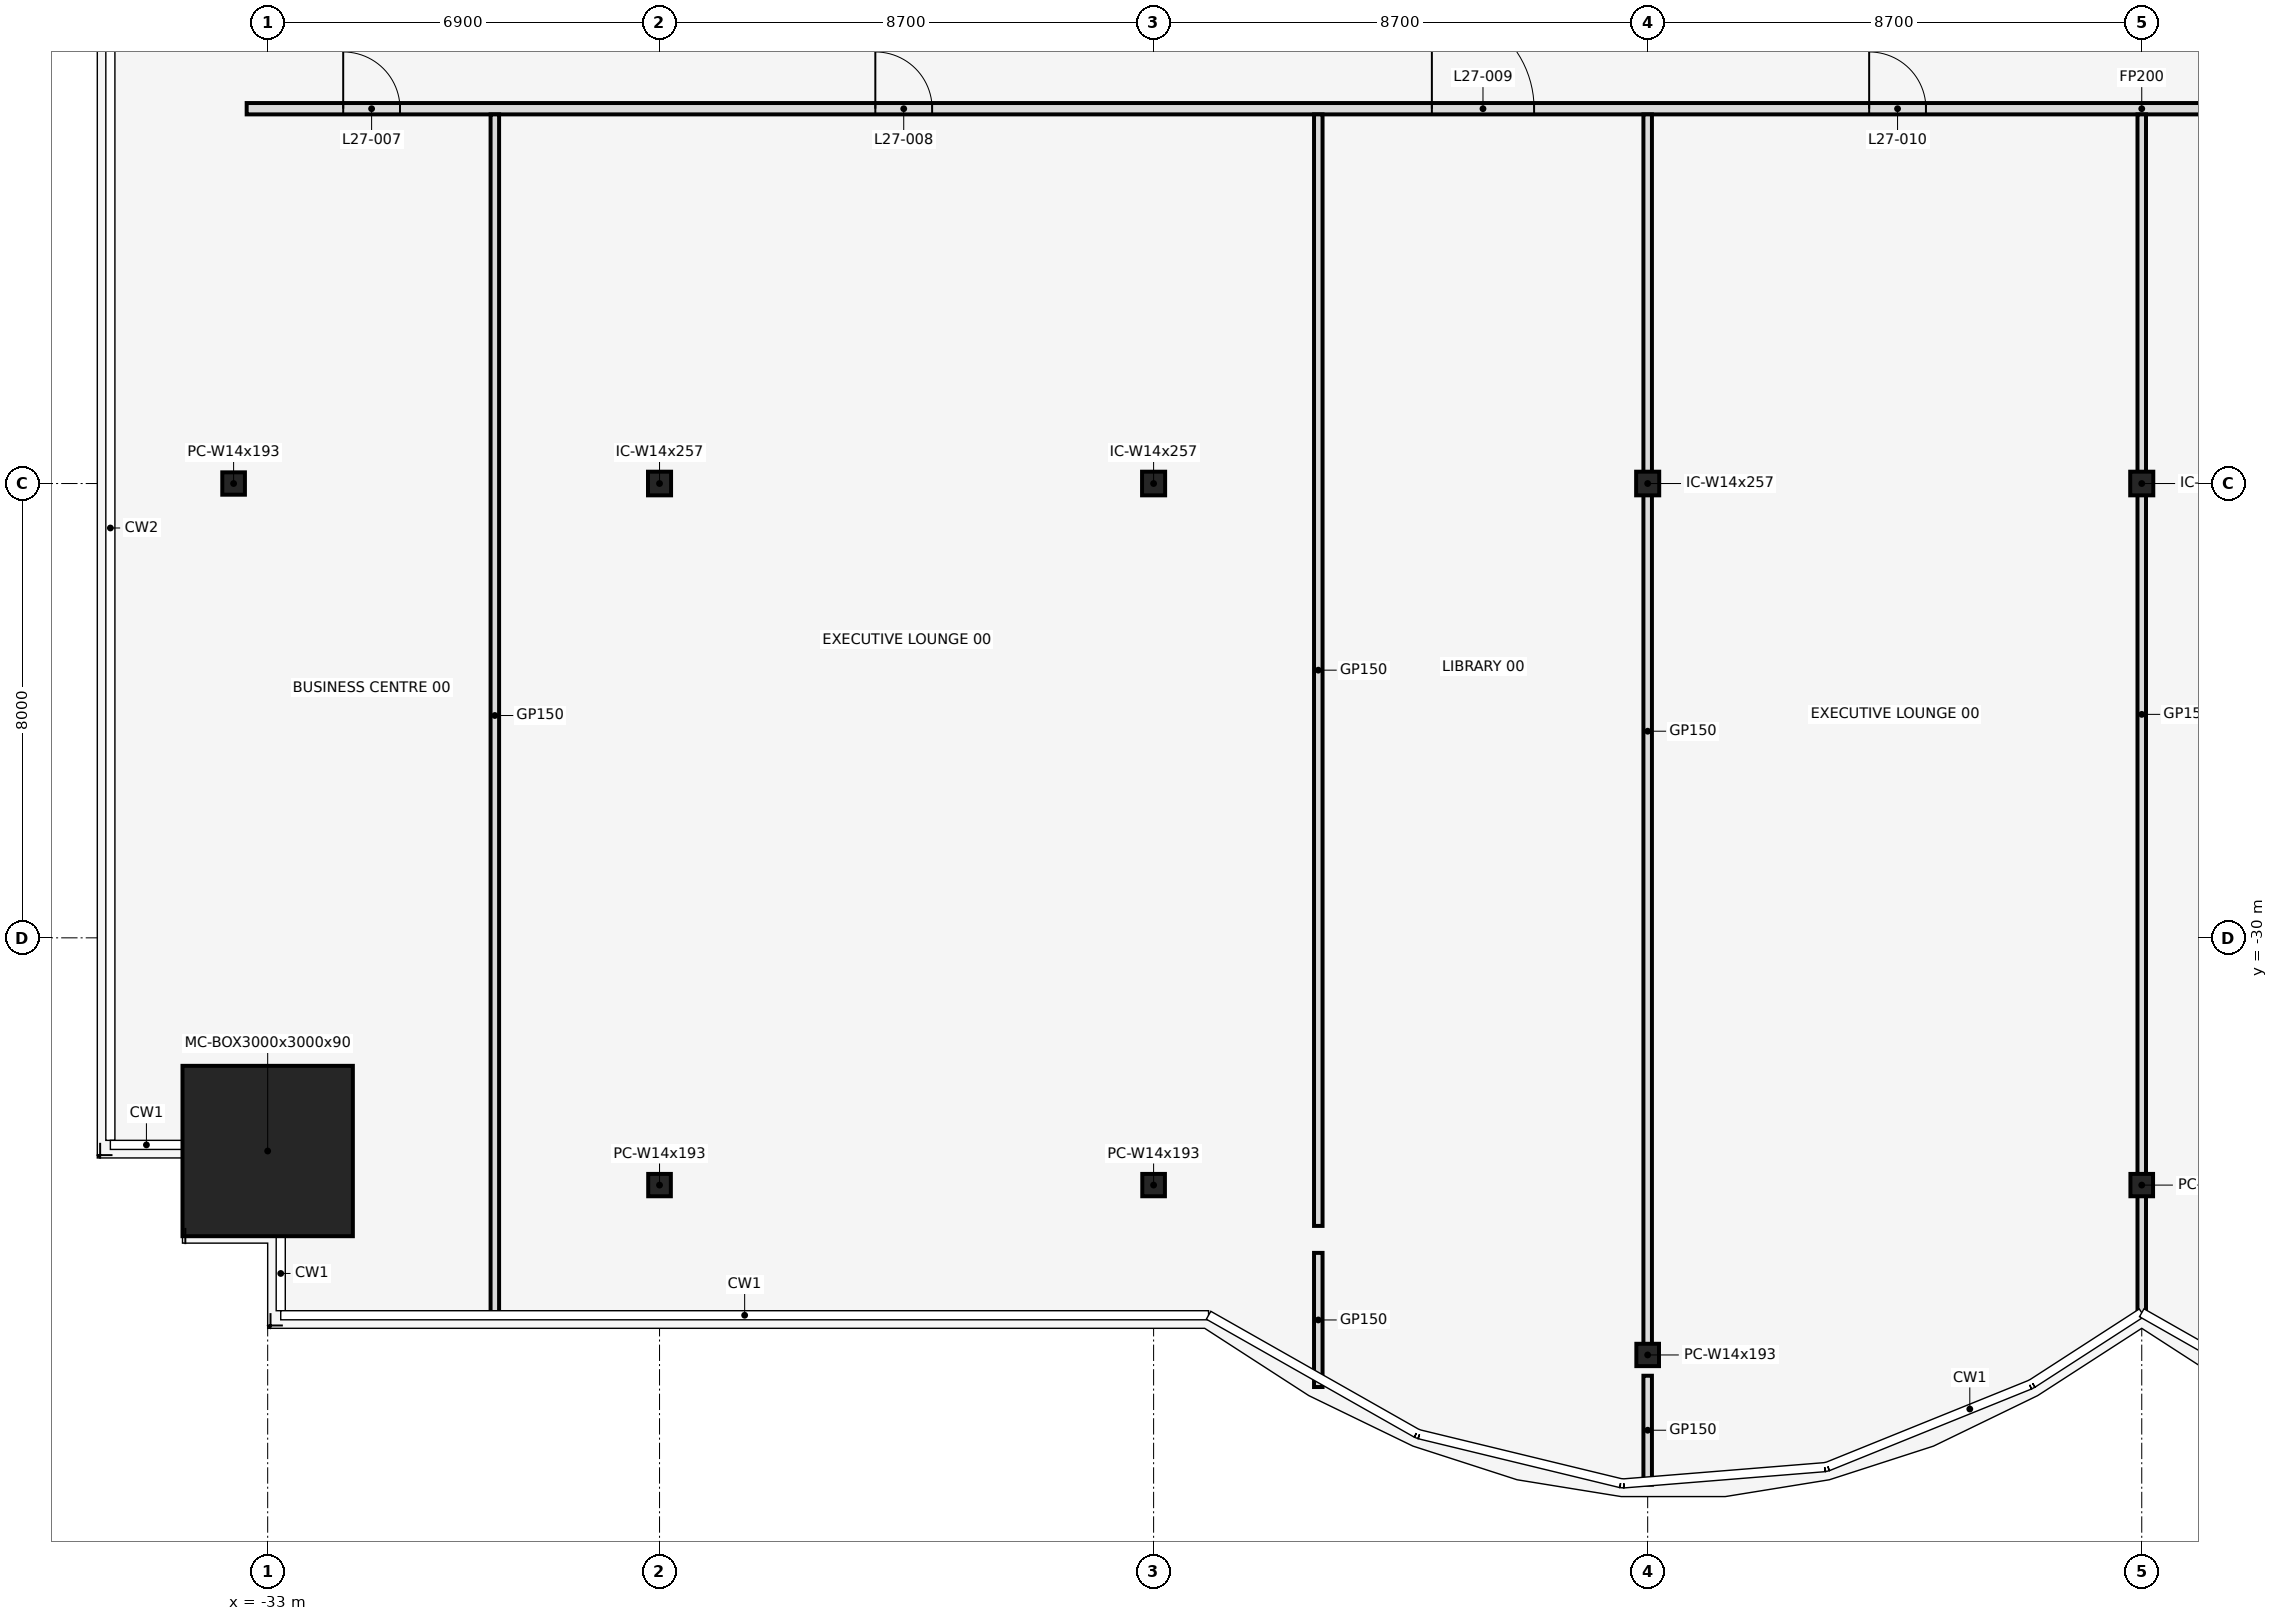
"""IFC4 building model, lengths in metres.
Left out: names, types, materials, properties, quantities, classifications, styles, units other than length and angle.
Written with IfcOpenShell. Run it as: python <this file> out.ifc"""

import sys

from ifc_helpers import new_model, si_unit, direction, frame, frame_2d, origin, origin_2d, place, context, subcontext, project, spatial, rectangle, hollow_rectangle, i_section, extrude, element, fill, save


model = new_model("IFC4")
c1 = context("Model", 3, precision=1e-05, world=origin(), true_north=direction((0.0, 1.0)))
c2 = subcontext(c1, "Body", "Model", "MODEL_VIEW")
j1 = project(units=[si_unit("LENGTHUNIT", "METRE"), si_unit("PLANEANGLEUNIT", "RADIAN")], contexts=[c1])
p1 = place(None, origin())
s1 = spatial("IfcSite", under=j1, at=p1, CompositionType="ELEMENT")
p2 = place(p1, origin())
s2 = spatial("IfcBuilding", under=s1, at=p2, CompositionType="ELEMENT")
p3 = place(p2, frame((0.0, 0.0, 126.8)))
s3 = spatial("IfcBuildingStorey", under=s2, at=p3, CompositionType="ELEMENT", Elevation=126.8)
p4 = place(p3, frame((-33.0, -33.754, 0.0), z_axis=(0.0, 0.0, 1.0), x_axis=(1.0, 0.0, 0.0)))
e1 = element("IfcColumn", 1, at=p4, inside=s3, PredefinedType="COLUMN", context=c2, shape_type="SweptSolid", body=[
    extrude(hollow_rectangle(XDim=3.0, YDim=3.0, WallThickness=0.09, at=origin_2d()), origin(), (0.0, 0.0, 1.0), 4.1),
])
for number, where, z_axis, x_axis in (
    (2, (-26.1, -34.354, 0.0), (0.0, 0.0, 1.0), (1.0, 0.0, 0.0)),
    (3, (-17.4, -34.354, 0.0), (0.0, 0.0, 1.0), (1.0, 0.0, 0.0)),
    (4, (-8.7, -37.345, 0.0), (0.0, 0.0, 1.0), (1.0, 0.0, 0.0)),
    (5, (0.0, -34.354, 0.0), (0.0, 0.0, 1.0), (1.0, 0.0, 0.0)),
    (6, (-33.6, -22.0, 0.0), (0.0, 0.0, 1.0), (1.0, 0.0, 0.0)),
):
    element("IfcColumn", number, at=place(p3, frame(where, z_axis=z_axis, x_axis=x_axis)), inside=s3, PredefinedType="COLUMN", context=c2, shape_type="SweptSolid", body=[
        extrude(i_section(OverallWidth=0.399, OverallDepth=0.394, WebThickness=0.023, FlangeThickness=0.037, at=origin_2d()), origin(), (0.0, 0.0, 1.0), 4.1),
    ])
for number, where, z_axis, x_axis in (
    (7, (-26.1, -22.0, 0.0), (0.0, 0.0, 1.0), (1.0, 0.0, 0.0)),
    (8, (-17.4, -22.0, 0.0), (0.0, 0.0, 1.0), (1.0, 0.0, 0.0)),
    (9, (-8.7, -22.0, 0.0), (0.0, 0.0, 1.0), (1.0, 0.0, 0.0)),
    (10, (0.0, -22.0, 0.0), (0.0, 0.0, 1.0), (1.0, 0.0, 0.0)),
):
    element("IfcColumn", number, at=place(p3, frame(where, z_axis=z_axis, x_axis=x_axis)), inside=s3, PredefinedType="COLUMN", context=c2, shape_type="SweptSolid", body=[
        extrude(i_section(OverallWidth=0.406, OverallDepth=0.417, WebThickness=0.03, FlangeThickness=0.048, at=origin_2d()), origin(), (0.0, 0.0, 1.0), 4.1),
    ])
p5 = place(p3, frame((-33.37, -15.4, 0.0), z_axis=(0.0, 0.0, 1.0), x_axis=(1.0, 0.0, 0.0)))
e11 = element("IfcWall", 11, at=p5, inside=s3, PredefinedType="PARTITIONING", context=c2, shape_type="SweptSolid", body=[
    extrude(rectangle(XDim=66.74, YDim=0.2, at=frame_2d((33.37, 0.0))), origin(), (0.0, 0.0, 1.0), 2.939),
])
p6 = place(p5, frame((1.7, 0.0, 0.0)))
e12 = element("IfcOpeningElement", 12, at=p6, cuts=e11, PredefinedType="OPENING", context=c2, shape_type="SweptSolid", body=[
    extrude(rectangle(XDim=1.0, YDim=2.1, at=frame_2d((0.5, 1.05))), frame((0.0, 0.112, 0.0), z_axis=(0.0, -1.0, 0.0), x_axis=(1.0, 0.0, 0.0)), (0.0, 0.0, 1.0), 0.224),
])
p7 = place(p5, frame((11.07, 0.0, 0.0)))
e13 = element("IfcOpeningElement", 13, at=p7, cuts=e11, PredefinedType="OPENING", context=c2, shape_type="SweptSolid", body=[
    extrude(rectangle(XDim=1.0, YDim=2.1, at=frame_2d((0.5, 1.05))), frame((0.0, 0.112, 0.0), z_axis=(0.0, -1.0, 0.0), x_axis=(1.0, 0.0, 0.0)), (0.0, 0.0, 1.0), 0.224),
])
p8 = place(p5, frame((20.87, 0.0, 0.0)))
e14 = element("IfcOpeningElement", 14, at=p8, cuts=e11, PredefinedType="OPENING", context=c2, shape_type="SweptSolid", body=[
    extrude(rectangle(XDim=1.8, YDim=2.1, at=frame_2d((0.9, 1.05))), frame((0.0, 0.112, 0.0), z_axis=(0.0, -1.0, 0.0), x_axis=(1.0, 0.0, 0.0)), (0.0, 0.0, 1.0), 0.224),
])
p9 = place(p5, frame((28.57, 0.0, 0.0)))
e15 = element("IfcOpeningElement", 15, at=p9, cuts=e11, PredefinedType="OPENING", context=c2, shape_type="SweptSolid", body=[
    extrude(rectangle(XDim=1.0, YDim=2.1, at=frame_2d((0.5, 1.05))), frame((0.0, 0.112, 0.0), z_axis=(0.0, -1.0, 0.0), x_axis=(1.0, 0.0, 0.0)), (0.0, 0.0, 1.0), 0.224),
])
p10 = place(p5, frame((36.77, 0.0, 0.0)))
e16 = element("IfcOpeningElement", 16, at=p10, cuts=e11, PredefinedType="OPENING", context=c2, shape_type="SweptSolid", body=[
    extrude(rectangle(XDim=1.8, YDim=2.1, at=frame_2d((0.9, 1.05))), frame((0.0, 0.112, 0.0), z_axis=(0.0, -1.0, 0.0), x_axis=(1.0, 0.0, 0.0)), (0.0, 0.0, 1.0), 0.224),
])
p11 = place(p5, frame((44.47, 0.0, 0.0)))
e17 = element("IfcOpeningElement", 17, at=p11, cuts=e11, PredefinedType="OPENING", context=c2, shape_type="SweptSolid", body=[
    extrude(rectangle(XDim=1.0, YDim=2.1, at=frame_2d((0.5, 1.05))), frame((0.0, 0.112, 0.0), z_axis=(0.0, -1.0, 0.0), x_axis=(1.0, 0.0, 0.0)), (0.0, 0.0, 1.0), 0.224),
])
p12 = place(p5, frame((48.77, 0.0, 0.0)))
e18 = element("IfcOpeningElement", 18, at=p12, cuts=e11, PredefinedType="OPENING", context=c2, shape_type="SweptSolid", body=[
    extrude(rectangle(XDim=1.0, YDim=2.1, at=frame_2d((0.5, 1.05))), frame((0.0, 0.112, 0.0), z_axis=(0.0, -1.0, 0.0), x_axis=(1.0, 0.0, 0.0)), (0.0, 0.0, 1.0), 0.224),
])
p13 = place(p5, frame((54.67, 0.0, 0.0)))
e19 = element("IfcOpeningElement", 19, at=p13, cuts=e11, PredefinedType="OPENING", context=c2, shape_type="SweptSolid", body=[
    extrude(rectangle(XDim=0.9, YDim=2.1, at=frame_2d((0.45, 1.05))), frame((0.0, 0.112, 0.0), z_axis=(0.0, -1.0, 0.0), x_axis=(1.0, 0.0, 0.0)), (0.0, 0.0, 1.0), 0.224),
])
p14 = place(p5, frame((60.37, 0.0, 0.0)))
e20 = element("IfcOpeningElement", 20, at=p14, cuts=e11, PredefinedType="OPENING", context=c2, shape_type="SweptSolid", body=[
    extrude(rectangle(XDim=1.0, YDim=2.1, at=frame_2d((0.5, 1.05))), frame((0.0, 0.112, 0.0), z_axis=(0.0, -1.0, 0.0), x_axis=(1.0, 0.0, 0.0)), (0.0, 0.0, 1.0), 0.224),
])
p15 = place(p5, frame((63.97, 0.0, 0.0)))
e21 = element("IfcOpeningElement", 21, at=p15, cuts=e11, PredefinedType="OPENING", context=c2, shape_type="SweptSolid", body=[
    extrude(rectangle(XDim=1.0, YDim=2.1, at=frame_2d((0.5, 1.05))), frame((0.0, 0.112, 0.0), z_axis=(0.0, -1.0, 0.0), x_axis=(1.0, 0.0, 0.0)), (0.0, 0.0, 1.0), 0.224),
])
p16 = place(p3, frame((-29.0, -36.67, 0.0), z_axis=(0.0, 0.0, 1.0), x_axis=(0.0, 1.0, 0.0)))
e22 = element("IfcWall", 22, at=p16, inside=s3, PredefinedType="PARTITIONING", context=c2, shape_type="SweptSolid", body=[
    extrude(rectangle(XDim=21.17, YDim=0.15, at=frame_2d((10.585, 0.0))), origin(), (0.0, 0.0, 1.0), 2.939),
])
p17 = place(p3, frame((-14.5, -37.91, 0.0), z_axis=(0.0, 0.0, 1.0), x_axis=(0.0, 1.0, 0.0)))
e23 = element("IfcWall", 23, at=p17, inside=s3, PredefinedType="PARTITIONING", context=c2, shape_type="SweptSolid", body=[
    extrude(rectangle(XDim=2.362, YDim=0.15, at=frame_2d((1.181, 0.0))), origin(), (0.0, 0.0, 1.0), 2.939),
])
p18 = place(p3, frame((-14.5, -35.073, 0.0), z_axis=(0.0, 0.0, 1.0), x_axis=(0.0, 1.0, 0.0)))
e24 = element("IfcWall", 24, at=p18, inside=s3, PredefinedType="PARTITIONING", context=c2, shape_type="SweptSolid", body=[
    extrude(rectangle(XDim=19.573, YDim=0.15, at=frame_2d((9.787, 0.0))), origin(), (0.0, 0.0, 1.0), 2.939),
])
p19 = place(p3, frame((-8.7, -39.63, 0.0), z_axis=(0.0, 0.0, 1.0), x_axis=(0.0, 1.0, 0.0)))
e25 = element("IfcWall", 25, at=p19, inside=s3, PredefinedType="PARTITIONING", context=c2, shape_type="SweptSolid", body=[
    extrude(rectangle(XDim=1.919, YDim=0.15, at=frame_2d((0.959, 0.0))), origin(), (0.0, 0.0, 1.0), 2.939),
])
p20 = place(p3, frame((-8.7, -37.223, 0.0), z_axis=(0.0, 0.0, 1.0), x_axis=(0.0, 1.0, 0.0)))
e26 = element("IfcWall", 26, at=p20, inside=s3, PredefinedType="PARTITIONING", context=c2, shape_type="SweptSolid", body=[
    extrude(rectangle(XDim=21.723, YDim=0.15, at=frame_2d((10.862, 0.0))), origin(), (0.0, 0.0, 1.0), 2.939),
])
p21 = place(p3, frame((0.0, -36.63, 0.0), z_axis=(0.0, 0.0, 1.0), x_axis=(0.0, 1.0, 0.0)))
e27 = element("IfcWall", 27, at=p21, inside=s3, PredefinedType="PARTITIONING", context=c2, shape_type="SweptSolid", body=[
    extrude(rectangle(XDim=21.13, YDim=0.15, at=frame_2d((10.565, 0.0))), origin(), (0.0, 0.0, 1.0), 2.939),
])
p22 = place(p6, frame((1.0, 0.0, 0.0), z_axis=(0.0, 0.0, 1.0), x_axis=(-1.0, 0.0, 0.0)))
e28 = element("IfcDoor", 28, at=p22, inside=s3, OperationType="SINGLE_SWING_LEFT", PredefinedType="DOOR", context=c2, shape_type="SweptSolid", body=[
    extrude(rectangle(XDim=1.0, YDim=2.1, at=frame_2d((0.5, 1.05))), frame((0.0, 0.025, 0.0), z_axis=(0.0, -1.0, 0.0), x_axis=(1.0, 0.0, 0.0)), (0.0, 0.0, 1.0), 0.05),
])
fill(e12, e28)
p23 = place(p7, frame((1.0, 0.0, 0.0), z_axis=(0.0, 0.0, 1.0), x_axis=(-1.0, 0.0, 0.0)))
e29 = element("IfcDoor", 29, at=p23, inside=s3, OperationType="SINGLE_SWING_RIGHT", PredefinedType="DOOR", context=c2, shape_type="SweptSolid", body=[
    extrude(rectangle(XDim=1.0, YDim=2.1, at=frame_2d((0.5, 1.05))), frame((0.0, 0.025, 0.0), z_axis=(0.0, -1.0, 0.0), x_axis=(1.0, 0.0, 0.0)), (0.0, 0.0, 1.0), 0.05),
])
fill(e13, e29)
p24 = place(p8, origin())
e30 = element("IfcDoor", 30, at=p24, inside=s3, OperationType="SINGLE_SWING_LEFT", PredefinedType="DOOR", context=c2, shape_type="SweptSolid", body=[
    extrude(rectangle(XDim=1.8, YDim=2.1, at=frame_2d((0.9, 1.05))), frame((0.0, 0.025, 0.0), z_axis=(0.0, -1.0, 0.0), x_axis=(1.0, 0.0, 0.0)), (0.0, 0.0, 1.0), 0.05),
])
fill(e14, e30)
p25 = place(p9, frame((1.0, 0.0, 0.0), z_axis=(0.0, 0.0, 1.0), x_axis=(-1.0, 0.0, 0.0)))
e31 = element("IfcDoor", 31, at=p25, inside=s3, OperationType="SINGLE_SWING_LEFT", PredefinedType="DOOR", context=c2, shape_type="SweptSolid", body=[
    extrude(rectangle(XDim=1.0, YDim=2.1, at=frame_2d((0.5, 1.05))), frame((0.0, 0.025, 0.0), z_axis=(0.0, -1.0, 0.0), x_axis=(1.0, 0.0, 0.0)), (0.0, 0.0, 1.0), 0.05),
])
fill(e15, e31)
save(model, sys.argv[1])
